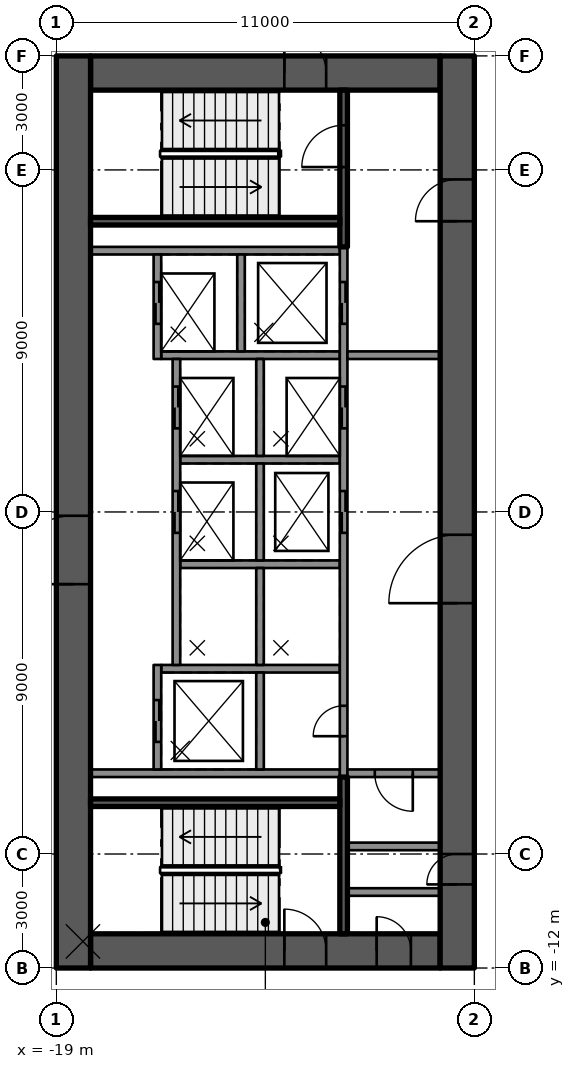
"""IFC4 building model, lengths in metres.
Left out: names, types, materials, properties, quantities, classifications, styles, units other than length and angle.
Written with IfcOpenShell. Run it as: python <this file> out.ifc"""

import sys

from ifc_helpers import new_model, si_unit, direction, frame, frame_2d, origin, place, context, subcontext, project, spatial, rectangle, extrude, element, fill, save


model = new_model("IFC4")
c1 = context("Model", 3, precision=1e-05, world=origin(), true_north=direction((0.0, 1.0)))
c2 = subcontext(c1, "Body", "Model", "MODEL_VIEW")
j1 = project(units=[si_unit("LENGTHUNIT", "METRE"), si_unit("PLANEANGLEUNIT", "RADIAN")], contexts=[c1])
p1 = place(None, origin())
s1 = spatial("IfcSite", under=j1, at=p1, CompositionType="ELEMENT")
p2 = place(p1, origin())
s2 = spatial("IfcBuilding", under=s1, at=p2, CompositionType="ELEMENT")
p3 = place(p2, frame((0.0, 0.0, 98.2)))
s3 = spatial("IfcBuildingStorey", under=s2, at=p3, CompositionType="ELEMENT", Elevation=98.2)
p4 = place(p3, frame((-18.1, 11.55, 0.0), z_axis=(0.0, 0.0, 1.0), x_axis=(1.0, 0.0, 0.0)))
e1 = element("IfcWall", 1, at=p4, inside=s3, PredefinedType="SHEAR", context=c2, shape_type="SweptSolid", body=[
    extrude(rectangle(XDim=9.2, YDim=0.9, at=frame_2d((4.6, 0.0))), origin(), (0.0, 0.0, 1.0), 4.0),
])
p5 = place(p4, frame((5.1, 0.0, 0.0)))
e2 = element("IfcOpeningElement", 2, at=p5, cuts=e1, PredefinedType="OPENING", context=c2, shape_type="SweptSolid", body=[
    extrude(rectangle(XDim=1.1, YDim=2.1, at=frame_2d((0.55, 1.05))), frame((0.0, 0.46, 0.0), z_axis=(0.0, -1.0, 0.0), x_axis=(1.0, 0.0, 0.0)), (0.0, 0.0, 1.0), 0.92),
])
p6 = place(p3, frame((-18.1, -11.55, 0.0), z_axis=(0.0, 0.0, 1.0), x_axis=(1.0, 0.0, 0.0)))
e3 = element("IfcWall", 3, at=p6, inside=s3, PredefinedType="SHEAR", context=c2, shape_type="SweptSolid", body=[
    extrude(rectangle(XDim=9.2, YDim=0.9, at=frame_2d((4.6, 0.0))), origin(), (0.0, 0.0, 1.0), 4.0),
])
p7 = place(p6, frame((5.1, 0.0, 0.0)))
e4 = element("IfcOpeningElement", 4, at=p7, cuts=e3, PredefinedType="OPENING", context=c2, shape_type="SweptSolid", body=[
    extrude(rectangle(XDim=1.1, YDim=2.1, at=frame_2d((0.55, 1.05))), frame((0.0, 0.46, 0.0), z_axis=(0.0, -1.0, 0.0), x_axis=(1.0, 0.0, 0.0)), (0.0, 0.0, 1.0), 0.92),
])
p8 = place(p6, frame((7.53, 0.0, 0.0)))
e5 = element("IfcOpeningElement", 5, at=p8, cuts=e3, PredefinedType="OPENING", context=c2, shape_type="SweptSolid", body=[
    extrude(rectangle(XDim=0.9, YDim=2.1, at=frame_2d((0.45, 1.05))), frame((0.0, 0.46, 0.0), z_axis=(0.0, -1.0, 0.0), x_axis=(1.0, 0.0, 0.0)), (0.0, 0.0, 1.0), 0.92),
])
p9 = place(p3, frame((-18.55, -12.0, 0.0), z_axis=(0.0, 0.0, 1.0), x_axis=(0.0, 1.0, 0.0)))
e6 = element("IfcWall", 6, at=p9, inside=s3, PredefinedType="SHEAR", context=c2, shape_type="SweptSolid", body=[
    extrude(rectangle(XDim=24.0, YDim=0.9, at=frame_2d((12.0, 0.0))), origin(), (0.0, 0.0, 1.0), 4.0),
])
p10 = place(p9, frame((10.1, 0.0, 0.0)))
e7 = element("IfcOpeningElement", 7, at=p10, cuts=e6, PredefinedType="OPENING", context=c2, shape_type="SweptSolid", body=[
    extrude(rectangle(XDim=1.8, YDim=2.1, at=frame_2d((0.9, 1.05))), frame((0.0, 0.46, 0.0), z_axis=(0.0, -1.0, 0.0), x_axis=(1.0, 0.0, 0.0)), (0.0, 0.0, 1.0), 0.92),
])
p11 = place(p3, frame((-8.45, -12.0, 0.0), z_axis=(0.0, 0.0, 1.0), x_axis=(0.0, 1.0, 0.0)))
e8 = element("IfcWall", 8, at=p11, inside=s3, PredefinedType="SHEAR", context=c2, shape_type="SweptSolid", body=[
    extrude(rectangle(XDim=24.0, YDim=0.9, at=frame_2d((12.0, 0.0))), origin(), (0.0, 0.0, 1.0), 4.0),
])
p12 = place(p11, frame((9.6, 0.0, 0.0)))
e9 = element("IfcOpeningElement", 9, at=p12, cuts=e8, PredefinedType="OPENING", context=c2, shape_type="SweptSolid", body=[
    extrude(rectangle(XDim=1.8, YDim=2.1, at=frame_2d((0.9, 1.05))), frame((0.0, 0.46, 0.0), z_axis=(0.0, -1.0, 0.0), x_axis=(1.0, 0.0, 0.0)), (0.0, 0.0, 1.0), 0.92),
])
p13 = place(p11, frame((19.65, 0.0, 0.0)))
e10 = element("IfcOpeningElement", 10, at=p13, cuts=e8, PredefinedType="OPENING", context=c2, shape_type="SweptSolid", body=[
    extrude(rectangle(XDim=1.1, YDim=2.1, at=frame_2d((0.55, 1.05))), frame((0.0, 0.46, 0.0), z_axis=(0.0, -1.0, 0.0), x_axis=(1.0, 0.0, 0.0)), (0.0, 0.0, 1.0), 0.92),
])
p14 = place(p11, frame((2.2, 0.0, 0.0)))
e11 = element("IfcOpeningElement", 11, at=p14, cuts=e8, PredefinedType="OPENING", context=c2, shape_type="SweptSolid", body=[
    extrude(rectangle(XDim=0.8, YDim=2.1, at=frame_2d((0.4, 1.05))), frame((0.0, 0.46, 0.0), z_axis=(0.0, -1.0, 0.0), x_axis=(1.0, 0.0, 0.0)), (0.0, 0.0, 1.0), 0.92),
])
for number, where, z_axis, x_axis in (
    (12, (-11.54, 6.875, 0.0), (0.0, 0.0, 1.0), (-1.0, 0.0, 0.0)),
    (13, (-11.54, -6.875, 0.0), (0.0, 0.0, 1.0), (-1.0, 0.0, 0.0)),
):
    element("IfcWall", number, at=place(p3, frame(where, z_axis=z_axis, x_axis=x_axis)), inside=s3, PredefinedType="SOLIDWALL", context=c2, shape_type="SweptSolid", body=[
        extrude(rectangle(XDim=6.56, YDim=0.2, at=frame_2d((3.28, 0.0))), origin(), (0.0, 0.0, 1.0), 3.59),
    ])
p15 = place(p3, frame((-11.54, -4.125, 0.0), z_axis=(0.0, 0.0, 1.0), x_axis=(-1.0, 0.0, 0.0)))
e14 = element("IfcWall", 14, at=p15, inside=s3, PredefinedType="SOLIDWALL", context=c2, shape_type="SweptSolid", body=[
    extrude(rectangle(XDim=4.7, YDim=0.2, at=frame_2d((2.35, 0.0))), origin(), (0.0, 0.0, 1.0), 3.59),
])
for number, where, z_axis, x_axis in (
    (15, (-11.54, -1.375, 0.0), (0.0, 0.0, 1.0), (-1.0, 0.0, 0.0)),
    (16, (-11.54, 1.375, 0.0), (0.0, 0.0, 1.0), (-1.0, 0.0, 0.0)),
):
    element("IfcWall", number, at=place(p3, frame(where, z_axis=z_axis, x_axis=x_axis)), inside=s3, PredefinedType="SOLIDWALL", context=c2, shape_type="SweptSolid", body=[
        extrude(rectangle(XDim=4.2, YDim=0.2, at=frame_2d((2.1, 0.0))), origin(), (0.0, 0.0, 1.0), 3.59),
    ])
p16 = place(p3, frame((-11.54, 4.125, 0.0), z_axis=(0.0, 0.0, 1.0), x_axis=(-1.0, 0.0, 0.0)))
e17 = element("IfcWall", 17, at=p16, inside=s3, PredefinedType="SOLIDWALL", context=c2, shape_type="SweptSolid", body=[
    extrude(rectangle(XDim=4.7, YDim=0.2, at=frame_2d((2.35, 0.0))), origin(), (0.0, 0.0, 1.0), 3.59),
])
p17 = place(p3, frame((-11.44, -6.975, 0.0), z_axis=(0.0, 0.0, 1.0), x_axis=(0.0, 1.0, 0.0)))
e18 = element("IfcWall", 18, at=p17, inside=s3, PredefinedType="SOLIDWALL", context=c2, shape_type="SweptSolid", body=[
    extrude(rectangle(XDim=13.95, YDim=0.2, at=frame_2d((6.975, 0.0))), origin(), (0.0, 0.0, 1.0), 3.59),
])
p18 = place(p17, frame((6.425, 0.0, 0.0)))
e19 = element("IfcOpeningElement", 19, at=p18, cuts=e18, PredefinedType="OPENING", context=c2, shape_type="SweptSolid", body=[
    extrude(rectangle(XDim=1.1, YDim=2.1, at=frame_2d((0.55, 1.05))), frame((0.0, 0.11, 0.0), z_axis=(0.0, -1.0, 0.0), x_axis=(1.0, 0.0, 0.0)), (0.0, 0.0, 1.0), 0.22),
])
p19 = place(p17, frame((9.175, 0.0, 0.0)))
e20 = element("IfcOpeningElement", 20, at=p19, cuts=e18, PredefinedType="OPENING", context=c2, shape_type="SweptSolid", body=[
    extrude(rectangle(XDim=1.1, YDim=2.1, at=frame_2d((0.55, 1.05))), frame((0.0, 0.11, 0.0), z_axis=(0.0, -1.0, 0.0), x_axis=(1.0, 0.0, 0.0)), (0.0, 0.0, 1.0), 0.22),
])
p20 = place(p17, frame((11.925, 0.0, 0.0)))
e21 = element("IfcOpeningElement", 21, at=p20, cuts=e18, PredefinedType="OPENING", context=c2, shape_type="SweptSolid", body=[
    extrude(rectangle(XDim=1.1, YDim=2.1, at=frame_2d((0.55, 1.05))), frame((0.0, 0.11, 0.0), z_axis=(0.0, -1.0, 0.0), x_axis=(1.0, 0.0, 0.0)), (0.0, 0.0, 1.0), 0.22),
])
p21 = place(p17, frame((1.075, 0.0, 0.0)))
e22 = element("IfcOpeningElement", 22, at=p21, cuts=e18, PredefinedType="OPENING", context=c2, shape_type="SweptSolid", body=[
    extrude(rectangle(XDim=0.8, YDim=2.1, at=frame_2d((0.4, 1.05))), frame((0.0, 0.11, 0.0), z_axis=(0.0, -1.0, 0.0), x_axis=(1.0, 0.0, 0.0)), (0.0, 0.0, 1.0), 0.22),
])
for number, where, z_axis, x_axis in (
    (23, (-13.64, -6.775, 0.0), (0.0, 0.0, 1.0), (0.0, 1.0, 0.0)),
    (24, (-13.64, -4.025, 0.0), (0.0, 0.0, 1.0), (0.0, 1.0, 0.0)),
    (25, (-13.64, -1.275, 0.0), (0.0, 0.0, 1.0), (0.0, 1.0, 0.0)),
    (26, (-13.64, 1.475, 0.0), (0.0, 0.0, 1.0), (0.0, 1.0, 0.0)),
    (27, (-14.14, 4.225, 0.0), (0.0, 0.0, 1.0), (0.0, 1.0, 0.0)),
):
    element("IfcWall", number, at=place(p3, frame(where, z_axis=z_axis, x_axis=x_axis)), inside=s3, PredefinedType="SOLIDWALL", context=c2, shape_type="SweptSolid", body=[
        extrude(rectangle(XDim=2.55, YDim=0.2, at=frame_2d((1.275, 0.0))), origin(), (0.0, 0.0, 1.0), 3.59),
    ])
p22 = place(p3, frame((-16.34, -6.775, 0.0), z_axis=(0.0, 0.0, 1.0), x_axis=(0.0, 1.0, 0.0)))
e28 = element("IfcWall", 28, at=p22, inside=s3, PredefinedType="SOLIDWALL", context=c2, shape_type="SweptSolid", body=[
    extrude(rectangle(XDim=2.75, YDim=0.2, at=frame_2d((1.375, 0.0))), origin(), (0.0, 0.0, 1.0), 3.59),
])
p23 = place(p22, frame((0.725, 0.0, 0.0)))
e29 = element("IfcOpeningElement", 29, at=p23, cuts=e28, PredefinedType="OPENING", context=c2, shape_type="SweptSolid", body=[
    extrude(rectangle(XDim=1.1, YDim=2.1, at=frame_2d((0.55, 1.05))), frame((0.0, 0.11, 0.0), z_axis=(0.0, -1.0, 0.0), x_axis=(1.0, 0.0, 0.0)), (0.0, 0.0, 1.0), 0.22),
])
p24 = place(p3, frame((-15.84, -4.025, 0.0), z_axis=(0.0, 0.0, 1.0), x_axis=(0.0, 1.0, 0.0)))
e30 = element("IfcWall", 30, at=p24, inside=s3, PredefinedType="SOLIDWALL", context=c2, shape_type="SweptSolid", body=[
    extrude(rectangle(XDim=8.05, YDim=0.2, at=frame_2d((4.025, 0.0))), origin(), (0.0, 0.0, 1.0), 3.59),
])
p25 = place(p24, frame((3.475, 0.0, 0.0)))
e31 = element("IfcOpeningElement", 31, at=p25, cuts=e30, PredefinedType="OPENING", context=c2, shape_type="SweptSolid", body=[
    extrude(rectangle(XDim=1.1, YDim=2.1, at=frame_2d((0.55, 1.05))), frame((0.0, 0.11, 0.0), z_axis=(0.0, -1.0, 0.0), x_axis=(1.0, 0.0, 0.0)), (0.0, 0.0, 1.0), 0.22),
])
p26 = place(p24, frame((6.225, 0.0, 0.0)))
e32 = element("IfcOpeningElement", 32, at=p26, cuts=e30, PredefinedType="OPENING", context=c2, shape_type="SweptSolid", body=[
    extrude(rectangle(XDim=1.1, YDim=2.1, at=frame_2d((0.55, 1.05))), frame((0.0, 0.11, 0.0), z_axis=(0.0, -1.0, 0.0), x_axis=(1.0, 0.0, 0.0)), (0.0, 0.0, 1.0), 0.22),
])
p27 = place(p3, frame((-16.34, 4.025, 0.0), z_axis=(0.0, 0.0, 1.0), x_axis=(0.0, 1.0, 0.0)))
e33 = element("IfcWall", 33, at=p27, inside=s3, PredefinedType="SOLIDWALL", context=c2, shape_type="SweptSolid", body=[
    extrude(rectangle(XDim=2.75, YDim=0.2, at=frame_2d((1.375, 0.0))), origin(), (0.0, 0.0, 1.0), 3.59),
])
p28 = place(p27, frame((0.925, 0.0, 0.0)))
e34 = element("IfcOpeningElement", 34, at=p28, cuts=e33, PredefinedType="OPENING", context=c2, shape_type="SweptSolid", body=[
    extrude(rectangle(XDim=1.1, YDim=2.1, at=frame_2d((0.55, 1.05))), frame((0.0, 0.11, 0.0), z_axis=(0.0, -1.0, 0.0), x_axis=(1.0, 0.0, 0.0)), (0.0, 0.0, 1.0), 0.22),
])
p29 = place(p3, frame((-11.44, 6.975, 0.0), z_axis=(0.0, 0.0, 1.0), x_axis=(0.0, 1.0, 0.0)))
e35 = element("IfcWall", 35, at=p29, inside=s3, PredefinedType="SOLIDWALL", context=c2, shape_type="SweptSolid", body=[
    extrude(rectangle(XDim=4.125, YDim=0.2, at=frame_2d((2.062, 0.0))), origin(), (0.0, 0.0, 1.0), 3.59),
])
p30 = place(p29, frame((2.1, 0.0, 0.0)))
e36 = element("IfcOpeningElement", 36, at=p30, cuts=e35, PredefinedType="OPENING", context=c2, shape_type="SweptSolid", body=[
    extrude(rectangle(XDim=1.1, YDim=2.1, at=frame_2d((0.55, 1.05))), frame((0.0, 0.11, 0.0), z_axis=(0.0, -1.0, 0.0), x_axis=(1.0, 0.0, 0.0)), (0.0, 0.0, 1.0), 0.22),
])
p31 = place(p3, frame((-11.54, 7.65, 0.0), z_axis=(0.0, 0.0, 1.0), x_axis=(-1.0, 0.0, 0.0)))
e37 = element("IfcWall", 37, at=p31, inside=s3, PredefinedType="SOLIDWALL", context=c2, shape_type="SweptSolid", body=[
    extrude(rectangle(XDim=6.56, YDim=0.2, at=frame_2d((3.28, 0.0))), origin(), (0.0, 0.0, 1.0), 3.59),
])
p32 = place(p3, frame((-11.44, -11.1, 0.0), z_axis=(0.0, 0.0, 1.0), x_axis=(0.0, 1.0, 0.0)))
e38 = element("IfcWall", 38, at=p32, inside=s3, PredefinedType="SOLIDWALL", context=c2, shape_type="SweptSolid", body=[
    extrude(rectangle(XDim=4.125, YDim=0.2, at=frame_2d((2.062, 0.0))), origin(), (0.0, 0.0, 1.0), 3.59),
])
p33 = place(p3, frame((-11.54, -7.65, 0.0), z_axis=(0.0, 0.0, 1.0), x_axis=(-1.0, 0.0, 0.0)))
e39 = element("IfcWall", 39, at=p33, inside=s3, PredefinedType="SOLIDWALL", context=c2, shape_type="SweptSolid", body=[
    extrude(rectangle(XDim=6.56, YDim=0.2, at=frame_2d((3.28, 0.0))), origin(), (0.0, 0.0, 1.0), 3.59),
])
p34 = place(p3, frame((-8.9, 4.125, 0.0), z_axis=(0.0, 0.0, 1.0), x_axis=(-1.0, 0.0, 0.0)))
e40 = element("IfcWall", 40, at=p34, inside=s3, PredefinedType="PARTITIONING", context=c2, shape_type="SweptSolid", body=[
    extrude(rectangle(XDim=2.44, YDim=0.2, at=frame_2d((1.22, 0.0))), origin(), (0.0, 0.0, 1.0), 3.59),
])
p35 = place(p3, frame((-8.9, -6.875, 0.0), z_axis=(0.0, 0.0, 1.0), x_axis=(-1.0, 0.0, 0.0)))
e41 = element("IfcWall", 41, at=p35, inside=s3, PredefinedType="PARTITIONING", context=c2, shape_type="SweptSolid", body=[
    extrude(rectangle(XDim=2.44, YDim=0.2, at=frame_2d((1.22, 0.0))), origin(), (0.0, 0.0, 1.0), 3.59),
])
p36 = place(p35, frame((0.72, 0.0, 0.0)))
e42 = element("IfcOpeningElement", 42, at=p36, cuts=e41, PredefinedType="OPENING", context=c2, shape_type="SweptSolid", body=[
    extrude(rectangle(XDim=1.0, YDim=2.1, at=frame_2d((0.5, 1.05))), frame((0.0, 0.11, 0.0), z_axis=(0.0, -1.0, 0.0), x_axis=(1.0, 0.0, 0.0)), (0.0, 0.0, 1.0), 0.22),
])
for number, where, z_axis, x_axis in (
    (43, (-8.9, -10.0, 0.0), (0.0, 0.0, 1.0), (-1.0, 0.0, 0.0)),
    (44, (-8.9, -8.8, 0.0), (0.0, 0.0, 1.0), (-1.0, 0.0, 0.0)),
):
    element("IfcWall", number, at=place(p3, frame(where, z_axis=z_axis, x_axis=x_axis)), inside=s3, PredefinedType="PARTITIONING", context=c2, shape_type="SweptSolid", body=[
        extrude(rectangle(XDim=2.44, YDim=0.2, at=frame_2d((1.22, 0.0))), origin(), (0.0, 0.0, 1.0), 3.59),
    ])
p37 = place(p23, origin())
e45 = element("IfcDoor", 45, at=p37, inside=s3, OperationType="DOUBLE_DOOR_SLIDING", PredefinedType="DOOR", context=c2, shape_type="SweptSolid", body=[
    extrude(rectangle(XDim=1.1, YDim=2.1, at=frame_2d((0.55, 1.05))), frame((0.0, 0.025, 0.0), z_axis=(0.0, -1.0, 0.0), x_axis=(1.0, 0.0, 0.0)), (0.0, 0.0, 1.0), 0.05),
])
fill(e29, e45)
p38 = place(p18, origin())
e46 = element("IfcDoor", 46, at=p38, inside=s3, OperationType="DOUBLE_DOOR_SLIDING", PredefinedType="DOOR", context=c2, shape_type="SweptSolid", body=[
    extrude(rectangle(XDim=1.1, YDim=2.1, at=frame_2d((0.55, 1.05))), frame((0.0, 0.025, 0.0), z_axis=(0.0, -1.0, 0.0), x_axis=(1.0, 0.0, 0.0)), (0.0, 0.0, 1.0), 0.05),
])
fill(e19, e46)
p39 = place(p25, origin())
e47 = element("IfcDoor", 47, at=p39, inside=s3, OperationType="DOUBLE_DOOR_SLIDING", PredefinedType="DOOR", context=c2, shape_type="SweptSolid", body=[
    extrude(rectangle(XDim=1.1, YDim=2.1, at=frame_2d((0.55, 1.05))), frame((0.0, 0.025, 0.0), z_axis=(0.0, -1.0, 0.0), x_axis=(1.0, 0.0, 0.0)), (0.0, 0.0, 1.0), 0.05),
])
fill(e31, e47)
p40 = place(p19, origin())
e48 = element("IfcDoor", 48, at=p40, inside=s3, OperationType="DOUBLE_DOOR_SLIDING", PredefinedType="DOOR", context=c2, shape_type="SweptSolid", body=[
    extrude(rectangle(XDim=1.1, YDim=2.1, at=frame_2d((0.55, 1.05))), frame((0.0, 0.025, 0.0), z_axis=(0.0, -1.0, 0.0), x_axis=(1.0, 0.0, 0.0)), (0.0, 0.0, 1.0), 0.05),
])
fill(e20, e48)
p41 = place(p26, origin())
e49 = element("IfcDoor", 49, at=p41, inside=s3, OperationType="DOUBLE_DOOR_SLIDING", PredefinedType="DOOR", context=c2, shape_type="SweptSolid", body=[
    extrude(rectangle(XDim=1.1, YDim=2.1, at=frame_2d((0.55, 1.05))), frame((0.0, 0.025, 0.0), z_axis=(0.0, -1.0, 0.0), x_axis=(1.0, 0.0, 0.0)), (0.0, 0.0, 1.0), 0.05),
])
fill(e32, e49)
p42 = place(p20, origin())
e50 = element("IfcDoor", 50, at=p42, inside=s3, OperationType="DOUBLE_DOOR_SLIDING", PredefinedType="DOOR", context=c2, shape_type="SweptSolid", body=[
    extrude(rectangle(XDim=1.1, YDim=2.1, at=frame_2d((0.55, 1.05))), frame((0.0, 0.025, 0.0), z_axis=(0.0, -1.0, 0.0), x_axis=(1.0, 0.0, 0.0)), (0.0, 0.0, 1.0), 0.05),
])
fill(e21, e50)
p43 = place(p28, origin())
e51 = element("IfcDoor", 51, at=p43, inside=s3, OperationType="DOUBLE_DOOR_SLIDING", PredefinedType="DOOR", context=c2, shape_type="SweptSolid", body=[
    extrude(rectangle(XDim=1.1, YDim=2.1, at=frame_2d((0.55, 1.05))), frame((0.0, 0.025, 0.0), z_axis=(0.0, -1.0, 0.0), x_axis=(1.0, 0.0, 0.0)), (0.0, 0.0, 1.0), 0.05),
])
fill(e34, e51)
p44 = place(p21, origin())
e52 = element("IfcDoor", 52, at=p44, inside=s3, OperationType="SINGLE_SWING_LEFT", PredefinedType="DOOR", context=c2, shape_type="SweptSolid", body=[
    extrude(rectangle(XDim=0.8, YDim=2.1, at=frame_2d((0.4, 1.05))), frame((0.0, 0.025, 0.0), z_axis=(0.0, -1.0, 0.0), x_axis=(1.0, 0.0, 0.0)), (0.0, 0.0, 1.0), 0.05),
])
fill(e22, e52)
p45 = place(p12, origin())
e53 = element("IfcDoor", 53, at=p45, inside=s3, OperationType="SINGLE_SWING_LEFT", PredefinedType="DOOR", context=c2, shape_type="SweptSolid", body=[
    extrude(rectangle(XDim=1.8, YDim=2.1, at=frame_2d((0.9, 1.05))), frame((0.0, 0.025, 0.0), z_axis=(0.0, -1.0, 0.0), x_axis=(1.0, 0.0, 0.0)), (0.0, 0.0, 1.0), 0.05),
])
fill(e9, e53)
p46 = place(p10, origin())
e54 = element("IfcDoor", 54, at=p46, inside=s3, OperationType="SINGLE_SWING_LEFT", PredefinedType="DOOR", context=c2, shape_type="SweptSolid", body=[
    extrude(rectangle(XDim=1.8, YDim=2.1, at=frame_2d((0.9, 1.05))), frame((0.0, 0.025, 0.0), z_axis=(0.0, -1.0, 0.0), x_axis=(1.0, 0.0, 0.0)), (0.0, 0.0, 1.0), 0.05),
])
fill(e7, e54)
p47 = place(p13, origin())
e55 = element("IfcDoor", 55, at=p47, inside=s3, OperationType="SINGLE_SWING_RIGHT", PredefinedType="DOOR", context=c2, shape_type="SweptSolid", body=[
    extrude(rectangle(XDim=1.1, YDim=2.1, at=frame_2d((0.55, 1.05))), frame((0.0, 0.025, 0.0), z_axis=(0.0, -1.0, 0.0), x_axis=(1.0, 0.0, 0.0)), (0.0, 0.0, 1.0), 0.05),
])
fill(e10, e55)
p48 = place(p5, origin())
e56 = element("IfcDoor", 56, at=p48, inside=s3, OperationType="SINGLE_SWING_RIGHT", PredefinedType="DOOR", context=c2, shape_type="SweptSolid", body=[
    extrude(rectangle(XDim=1.1, YDim=2.1, at=frame_2d((0.55, 1.05))), frame((0.0, 0.025, 0.0), z_axis=(0.0, -1.0, 0.0), x_axis=(1.0, 0.0, 0.0)), (0.0, 0.0, 1.0), 0.05),
])
fill(e2, e56)
p49 = place(p7, origin())
e57 = element("IfcDoor", 57, at=p49, inside=s3, OperationType="SINGLE_SWING_RIGHT", PredefinedType="DOOR", context=c2, shape_type="SweptSolid", body=[
    extrude(rectangle(XDim=1.1, YDim=2.1, at=frame_2d((0.55, 1.05))), frame((0.0, 0.025, 0.0), z_axis=(0.0, -1.0, 0.0), x_axis=(1.0, 0.0, 0.0)), (0.0, 0.0, 1.0), 0.05),
])
fill(e4, e57)
p50 = place(p30, origin())
e58 = element("IfcDoor", 58, at=p50, inside=s3, OperationType="SINGLE_SWING_RIGHT", PredefinedType="DOOR", context=c2, shape_type="SweptSolid", body=[
    extrude(rectangle(XDim=1.1, YDim=2.1, at=frame_2d((0.55, 1.05))), frame((0.0, 0.025, 0.0), z_axis=(0.0, -1.0, 0.0), x_axis=(1.0, 0.0, 0.0)), (0.0, 0.0, 1.0), 0.05),
])
fill(e36, e58)
p51 = place(p8, origin())
e59 = element("IfcDoor", 59, at=p51, inside=s3, OperationType="SINGLE_SWING_RIGHT", PredefinedType="DOOR", context=c2, shape_type="SweptSolid", body=[
    extrude(rectangle(XDim=0.9, YDim=2.1, at=frame_2d((0.45, 1.05))), frame((0.0, 0.025, 0.0), z_axis=(0.0, -1.0, 0.0), x_axis=(1.0, 0.0, 0.0)), (0.0, 0.0, 1.0), 0.05),
])
fill(e5, e59)
p52 = place(p14, origin())
e60 = element("IfcDoor", 60, at=p52, inside=s3, OperationType="SINGLE_SWING_LEFT", PredefinedType="DOOR", context=c2, shape_type="SweptSolid", body=[
    extrude(rectangle(XDim=0.8, YDim=2.1, at=frame_2d((0.4, 1.05))), frame((0.0, 0.025, 0.0), z_axis=(0.0, -1.0, 0.0), x_axis=(1.0, 0.0, 0.0)), (0.0, 0.0, 1.0), 0.05),
])
fill(e11, e60)
p53 = place(p36, origin())
e61 = element("IfcDoor", 61, at=p53, inside=s3, OperationType="SINGLE_SWING_RIGHT", PredefinedType="DOOR", context=c2, shape_type="SweptSolid", body=[
    extrude(rectangle(XDim=1.0, YDim=2.1, at=frame_2d((0.5, 1.05))), frame((0.0, 0.025, 0.0), z_axis=(0.0, -1.0, 0.0), x_axis=(1.0, 0.0, 0.0)), (0.0, 0.0, 1.0), 0.05),
])
fill(e42, e61)
save(model, sys.argv[1])
